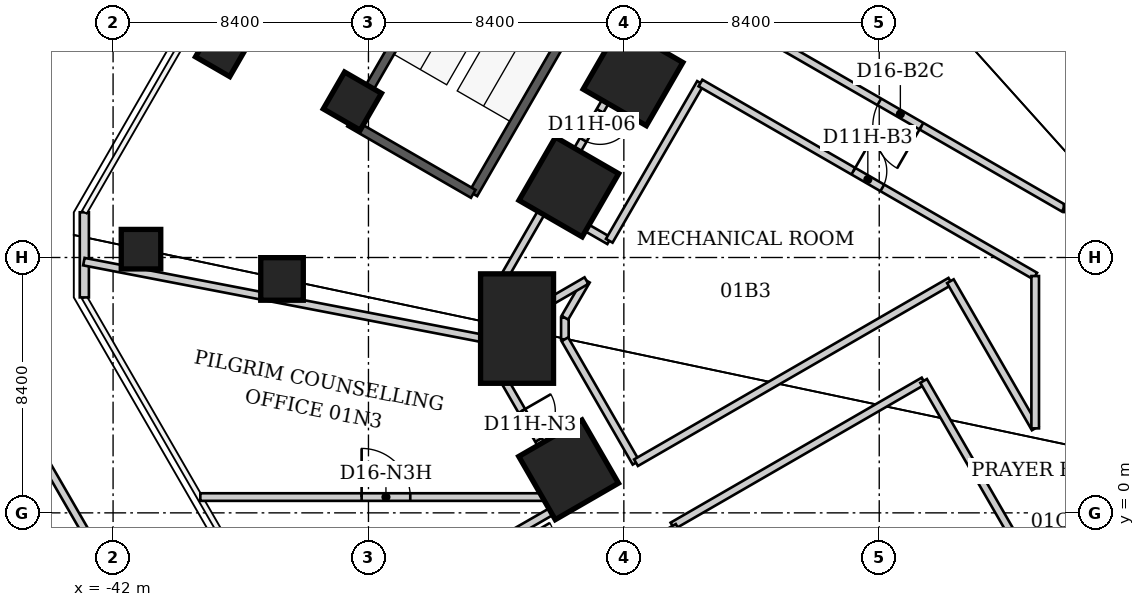
"""IFC4 building model, lengths in metres.
Left out: names, types, materials, properties, quantities, classifications, styles, units other than length and angle.
Written with IfcOpenShell. Run it as: python <this file> out.ifc"""

import sys

from ifc_helpers import new_model, si_unit, direction, frame, frame_2d, origin, origin_2d, place, context, subcontext, project, spatial, rectangle, extrude, element, fill, save


model = new_model("IFC4")
c1 = context("Model", 3, precision=1e-05, world=origin(), true_north=direction((0.0, 1.0)))
c2 = subcontext(c1, "Body", "Model", "MODEL_VIEW")
j1 = project(units=[si_unit("LENGTHUNIT", "METRE"), si_unit("PLANEANGLEUNIT", "RADIAN")], contexts=[c1])
p1 = place(None, origin())
s1 = spatial("IfcSite", under=j1, at=p1, CompositionType="ELEMENT")
p2 = place(p1, origin())
s2 = spatial("IfcBuilding", under=s1, at=p2, CompositionType="ELEMENT")
p3 = place(p2, frame((0.0, 0.0, 6.0)))
s3 = spatial("IfcBuildingStorey", under=s2, at=p3, CompositionType="ELEMENT", Elevation=6.0)
p4 = place(p3, frame((-27.016, 1.416, 0.0), z_axis=(0.0, 0.0, 1.0), x_axis=(-0.866025403784, -0.5, 0.0)))
e1 = element("IfcColumn", 1, at=p4, inside=s3, PredefinedType="COLUMN", context=c2, shape_type="SweptSolid", body=[
    extrude(rectangle(XDim=2.4, YDim=2.4, at=origin_2d()), origin(), (0.0, 0.0, 1.0), 6.0),
])
p5 = place(p3, frame((-28.713, 6.062, 0.0), z_axis=(0.0, 0.0, 1.0), x_axis=(-1.0, 0.0, 0.0)))
e2 = element("IfcColumn", 2, at=p5, inside=s3, PredefinedType="COLUMN", context=c2, shape_type="SweptSolid", body=[
    extrude(rectangle(XDim=2.4, YDim=3.6, at=origin_2d()), origin(), (0.0, 0.0, 1.0), 6.0),
])
for number, where, z_axis, x_axis in (
    (3, (-27.01, 10.719, 0.0), (0.0, 0.0, 1.0), (-0.866, 0.5, 0.0)),
    (4, (-24.899, 14.375, 0.0), (0.0, 0.0, 1.0), (-0.866, 0.5, 0.0)),
):
    element("IfcColumn", number, at=place(p3, frame(where, z_axis=z_axis, x_axis=x_axis)), inside=s3, PredefinedType="COLUMN", context=c2, shape_type="SweptSolid", body=[
        extrude(rectangle(XDim=2.4, YDim=2.4, at=origin_2d()), origin(), (0.0, 0.0, 1.0), 6.0),
    ])
for number, where, z_axis, x_axis in (
    (5, (-36.443, 7.694, 0.0), (0.0, 0.0, 1.0), (-1.0, 0.0, 0.0)),
    (6, (-34.129, 13.544, 0.0), (0.0, 0.0, 1.0), (-0.866, 0.5, 0.0)),
):
    element("IfcColumn", number, at=place(p3, frame(where, z_axis=z_axis, x_axis=x_axis)), inside=s3, PredefinedType="COLUMN", context=c2, shape_type="SweptSolid", body=[
        extrude(rectangle(XDim=1.4, YDim=1.4, at=origin_2d()), origin(), (0.0, 0.0, 1.0), 6.0),
    ])
for number, where, z_axis, x_axis in (
    (7, (-41.082, 8.674, 0.0), (0.0, 0.0, 1.0), (-1.0, 0.0, 0.0)),
    (8, (-38.4, 15.239, 0.0), (0.0, 0.0, 1.0), (-0.866, 0.5, 0.0)),
):
    element("IfcColumn", number, at=place(p3, frame(where, z_axis=z_axis, x_axis=x_axis)), inside=s3, PredefinedType="COLUMN", context=c2, shape_type="SweptSolid", body=[
        extrude(rectangle(XDim=1.3, YDim=1.3, at=origin_2d()), origin(), (0.0, 0.0, 1.0), 6.0),
    ])
p6 = place(p3, frame((-42.945, 7.087, 0.0), z_axis=(0.0, 0.0, 1.0), x_axis=(0.0, 1.0, 0.0)))
e9 = element("IfcWall", 9, at=p6, inside=s3, PredefinedType="SOLIDWALL", context=c2, shape_type="SweptSolid", body=[
    extrude(rectangle(XDim=2.8, YDim=0.3, at=frame_2d((1.4, 0.0))), origin(), (0.0, 0.0, 1.0), 5.84),
])
p7 = place(p3, frame((-33.343, 35.926, 0.0), z_axis=(0.0, 0.0, 1.0), x_axis=(-0.500005626994, -0.866022155013, 0.0)))
e10 = element("IfcWall", 10, at=p7, inside=s3, PredefinedType="PARAPET", context=c2, shape_type="SweptSolid", body=[
    extrude(rectangle(XDim=28.882, YDim=0.25, at=frame_2d((14.441, 0.0))), origin(), (0.0, 0.0, 1.0), 1.1),
])
p8 = place(p3, frame((-47.782, 7.822, 0.0), z_axis=(0.0, 0.0, 1.0), x_axis=(0.499999154746, -0.866025891791, 0.0)))
e11 = element("IfcWall", 11, at=p8, inside=s3, PredefinedType="PARAPET", context=c2, shape_type="SweptSolid", body=[
    extrude(rectangle(XDim=61.33, YDim=0.25, at=frame_2d((30.665, 0.0))), origin(), (0.0, 0.0, 1.0), 1.1),
])
p9 = place(p3, frame((-39.13, 0.52, 0.0), z_axis=(0.0, 0.0, 1.0), x_axis=(1.0, 0.0, 0.0)))
e12 = element("IfcWall", 12, at=p9, inside=s3, PredefinedType="PARTITIONING", context=c2, shape_type="SweptSolid", body=[
    extrude(rectangle(XDim=12.21, YDim=0.25, at=frame_2d((6.105, 0.0))), origin(), (0.0, 0.0, 1.0), 5.75),
])
p10 = place(p9, frame((5.305, 0.0, 0.0)))
e13 = element("IfcOpeningElement", 13, at=p10, cuts=e12, PredefinedType="OPENING", context=c2, shape_type="SweptSolid", body=[
    extrude(rectangle(XDim=1.6, YDim=2.4, at=frame_2d((0.8, 1.2))), frame((0.0, 0.125, 0.0), z_axis=(0.0, -1.0, 0.0), x_axis=(1.0, 0.0, 0.0)), (0.0, 0.0, 1.0), 0.25),
])
p11 = place(p3, frame((-29.54, 5.06, 0.0), z_axis=(0.0, 0.0, 1.0), x_axis=(0.499846097802, -0.866114241029, 0.0)))
e14 = element("IfcWall", 14, at=p11, inside=s3, PredefinedType="PARTITIONING", context=c2, shape_type="SweptSolid", body=[
    extrude(rectangle(XDim=5.242, YDim=0.25, at=frame_2d((2.621, 0.0))), origin(), (0.0, 0.0, 1.0), 4.04),
])
p12 = place(p11, frame((1.971, 0.0, 0.0)))
e15 = element("IfcOpeningElement", 15, at=p12, cuts=e14, PredefinedType="OPENING", context=c2, shape_type="SweptSolid", body=[
    extrude(rectangle(XDim=1.1, YDim=2.2, at=frame_2d((0.55, 1.1))), frame((0.0, 0.125, 0.0), z_axis=(0.0, -1.0, 0.0), x_axis=(1.0, 0.0, 0.0)), (0.0, 0.0, 1.0), 0.25),
])
p13 = place(p3, frame((-29.54, 5.645, 0.0), z_axis=(0.0, 0.0, 1.0), x_axis=(0.0, -1.0, 0.0)))
e16 = element("IfcWall", 16, at=p13, inside=s3, PredefinedType="PARTITIONING", context=c2, shape_type="SweptSolid", body=[
    extrude(rectangle(XDim=0.585, YDim=0.25, at=frame_2d((0.292, 0.0))), origin(), (0.0, 0.0, 1.0), 5.84),
])
p14 = place(p3, frame((-29.54, 5.68, 0.0), z_axis=(0.0, 0.0, 1.0), x_axis=(-0.981957231685, 0.189103133611, 0.0)))
e17 = element("IfcWall", 17, at=p14, inside=s3, PredefinedType="PARTITIONING", context=c2, shape_type="SweptSolid", body=[
    extrude(rectangle(XDim=13.667, YDim=0.25, at=frame_2d((6.833, 0.0))), origin(), (0.0, 0.0, 1.0), 5.75),
])
p15 = place(p3, frame((-29.54, 7.06, 0.0), z_axis=(0.0, 0.0, 1.0), x_axis=(0.0, -1.0, 0.0)))
e18 = element("IfcWall", 18, at=p15, inside=s3, PredefinedType="PARTITIONING", context=c2, shape_type="SweptSolid", body=[
    extrude(rectangle(XDim=1.22, YDim=0.25, at=frame_2d((0.61, 0.0))), origin(), (0.0, 0.0, 1.0), 5.84),
])
p16 = place(p3, frame((-27.76, 10.15, 0.0), z_axis=(0.0, 0.0, 1.0), x_axis=(-0.499181015942, -0.8664977284, 0.0)))
e19 = element("IfcWall", 19, at=p16, inside=s3, PredefinedType="PARTITIONING", context=c2, shape_type="SweptSolid", body=[
    extrude(rectangle(XDim=3.566, YDim=0.25, at=frame_2d((1.783, 0.0))), origin(), (0.0, 0.0, 1.0), 5.84),
])
p17 = place(p3, frame((-27.76, 10.15, 0.0), z_axis=(0.0, 0.0, 1.0), x_axis=(0.866202511239, -0.499693115345, 0.0)))
e20 = element("IfcWall", 20, at=p17, inside=s3, PredefinedType="PARTITIONING", context=c2, shape_type="SweptSolid", body=[
    extrude(rectangle(XDim=2.401, YDim=0.25, at=frame_2d((1.201, 0.0))), origin(), (0.0, 0.0, 1.0), 5.84),
])
p18 = place(p3, frame((-27.14, 5.71, 0.0), z_axis=(0.0, 0.0, 1.0), x_axis=(0.0, 1.0, 0.0)))
e21 = element("IfcWall", 21, at=p18, inside=s3, PredefinedType="PARTITIONING", context=c2, shape_type="SweptSolid", body=[
    extrude(rectangle(XDim=0.71, YDim=0.25, at=frame_2d((0.355, 0.0))), origin(), (0.0, 0.0, 1.0), 5.84),
])
p19 = place(p3, frame((-27.14, 6.42, 0.0), z_axis=(0.0, 0.0, 1.0), x_axis=(0.502902974743, 0.864342870622, 0.0)))
e22 = element("IfcWall", 22, at=p19, inside=s3, PredefinedType="PARTITIONING", context=c2, shape_type="SweptSolid", body=[
    extrude(rectangle(XDim=1.412, YDim=0.25, at=frame_2d((0.706, 0.0))), origin(), (0.0, 0.0, 1.0), 5.84),
])
p20 = place(p3, frame((-26.92, 0.52, 0.0), z_axis=(0.0, 0.0, 1.0), x_axis=(0.496138938357, -0.868243142124, 0.0)))
e23 = element("IfcWall", 23, at=p20, inside=s3, PredefinedType="PARTITIONING", context=c2, shape_type="SweptSolid", body=[
    extrude(rectangle(XDim=0.081, YDim=0.25, at=frame_2d((0.041, 0.0))), origin(), (0.0, 0.0, 1.0), 5.84),
])
p21 = place(p3, frame((-26.88, 0.45, 0.0), z_axis=(0.0, 0.0, 1.0), x_axis=(-0.866853445344, -0.49856303944, 0.0)))
e24 = element("IfcWall", 24, at=p21, inside=s3, PredefinedType="PARTITIONING", context=c2, shape_type="SweptSolid", body=[
    extrude(rectangle(XDim=2.146, YDim=0.25, at=frame_2d((1.073, 0.0))), origin(), (0.0, 0.0, 1.0), 5.84),
])
p22 = place(p3, frame((-26.43, 7.64, 0.0), z_axis=(0.0, 0.0, 1.0), x_axis=(-0.865520854062, -0.500872889249, 0.0)))
e25 = element("IfcWall", 25, at=p22, inside=s3, PredefinedType="PARTITIONING", context=c2, shape_type="SweptSolid", body=[
    extrude(rectangle(XDim=3.593, YDim=0.25, at=frame_2d((1.797, 0.0))), origin(), (0.0, 0.0, 1.0), 5.84),
])
p23 = place(p3, frame((-25.68, 8.95, 0.0), z_axis=(0.0, 0.0, 1.0), x_axis=(0.50043093139, 0.865776462436, 0.0)))
e26 = element("IfcWall", 26, at=p23, inside=s3, PredefinedType="PARTITIONING", context=c2, shape_type="SweptSolid", body=[
    extrude(rectangle(XDim=5.995, YDim=0.25, at=frame_2d((2.998, 0.0))), origin(), (0.0, 0.0, 1.0), 5.84),
])
p24 = place(p3, frame((-24.8, 1.65, 0.0), z_axis=(0.0, 0.0, 1.0), x_axis=(-0.499361596599, 0.866393672555, 0.0)))
e27 = element("IfcWall", 27, at=p24, inside=s3, PredefinedType="PARTITIONING", context=c2, shape_type="SweptSolid", body=[
    extrude(rectangle(XDim=4.686, YDim=0.25, at=frame_2d((2.343, 0.0))), origin(), (0.0, 0.0, 1.0), 5.84),
])
p25 = place(p3, frame((-24.76, 15.34, 0.0), z_axis=(0.0, 0.0, 1.0), x_axis=(-0.50043093139, -0.865776462436, 0.0)))
e28 = element("IfcWall", 28, at=p25, inside=s3, PredefinedType="PARTITIONING", context=c2, shape_type="SweptSolid", body=[
    extrude(rectangle(XDim=5.995, YDim=0.25, at=frame_2d((2.998, 0.0))), origin(), (0.0, 0.0, 1.0), 4.04),
])
p26 = place(p25, frame((2.448, 0.0, 0.0)))
e29 = element("IfcOpeningElement", 29, at=p26, cuts=e28, PredefinedType="OPENING", context=c2, shape_type="SweptSolid", body=[
    extrude(rectangle(XDim=1.1, YDim=2.2, at=frame_2d((0.55, 1.1))), frame((0.0, 0.125, 0.0), z_axis=(0.0, -1.0, 0.0), x_axis=(1.0, 0.0, 0.0)), (0.0, 0.0, 1.0), 0.25),
])
p27 = place(p3, frame((-23.6, -0.43, 0.0), z_axis=(0.0, 0.0, 1.0), x_axis=(0.865975432538, 0.500086542752, 0.0)))
e30 = element("IfcWall", 30, at=p27, inside=s3, PredefinedType="PARTITIONING", context=c2, shape_type="SweptSolid", body=[
    extrude(rectangle(XDim=9.538, YDim=0.25, at=frame_2d((4.769, 0.0))), origin(), (0.0, 0.0, 1.0), 5.84),
])
p28 = place(p3, frame((-22.68, 14.14, 0.0), z_axis=(0.0, 0.0, 1.0), x_axis=(0.866256251028, -0.499599947513, 0.0)))
e31 = element("IfcWall", 31, at=p28, inside=s3, PredefinedType="PARTITIONING", context=c2, shape_type="SweptSolid", body=[
    extrude(rectangle(XDim=12.71, YDim=0.25, at=frame_2d((6.355, 0.0))), origin(), (0.0, 0.0, 1.0), 5.84),
])
p29 = place(p28, frame((5.805, 0.0, 0.0)))
e32 = element("IfcOpeningElement", 32, at=p29, cuts=e31, PredefinedType="OPENING", context=c2, shape_type="SweptSolid", body=[
    extrude(rectangle(XDim=1.1, YDim=2.2, at=frame_2d((0.55, 1.1))), frame((0.0, 0.125, 0.0), z_axis=(0.0, -1.0, 0.0), x_axis=(1.0, 0.0, 0.0)), (0.0, 0.0, 1.0), 0.25),
])
p30 = place(p3, frame((-20.6, -5.62, 0.0), z_axis=(0.0, 0.0, 1.0), x_axis=(-0.50043093139, 0.865776462436, 0.0)))
e33 = element("IfcWall", 33, at=p30, inside=s3, PredefinedType="PARTITIONING", context=c2, shape_type="SweptSolid", body=[
    extrude(rectangle(XDim=5.995, YDim=0.25, at=frame_2d((2.998, 0.0))), origin(), (0.0, 0.0, 1.0), 5.84),
])
p31 = place(p3, frame((-15.34, 4.34, 0.0), z_axis=(0.0, 0.0, 1.0), x_axis=(0.499811677007, -0.866134104817, 0.0)))
e34 = element("IfcWall", 34, at=p31, inside=s3, PredefinedType="PARTITIONING", context=c2, shape_type="SweptSolid", body=[
    extrude(rectangle(XDim=7.343, YDim=0.25, at=frame_2d((3.671, 0.0))), origin(), (0.0, 0.0, 1.0), 5.84),
])
p32 = place(p3, frame((-14.46, 7.62, 0.0), z_axis=(0.0, 0.0, 1.0), x_axis=(-0.866012263686, -0.500022758628, 0.0)))
e35 = element("IfcWall", 35, at=p32, inside=s3, PredefinedType="PARTITIONING", context=c2, shape_type="SweptSolid", body=[
    extrude(rectangle(XDim=11.94, YDim=0.25, at=frame_2d((5.97, 0.0))), origin(), (0.0, 0.0, 1.0), 5.84),
])
p33 = place(p3, frame((-11.67, 2.78, 0.0), z_axis=(0.0, 0.0, 1.0), x_axis=(-0.49941093891, 0.866365231353, 0.0)))
e36 = element("IfcWall", 36, at=p33, inside=s3, PredefinedType="PARTITIONING", context=c2, shape_type="SweptSolid", body=[
    extrude(rectangle(XDim=5.587, YDim=0.25, at=frame_2d((2.793, 0.0))), origin(), (0.0, 0.0, 1.0), 5.84),
])
p34 = place(p3, frame((-11.67, 7.79, 0.0), z_axis=(0.0, 0.0, 1.0), x_axis=(0.0, -1.0, 0.0)))
e37 = element("IfcWall", 37, at=p34, inside=s3, PredefinedType="PARTITIONING", context=c2, shape_type="SweptSolid", body=[
    extrude(rectangle(XDim=5.01, YDim=0.25, at=frame_2d((2.505, 0.0))), origin(), (0.0, 0.0, 1.0), 5.84),
])
p35 = place(p3, frame((-10.73, 10.02, 0.0), z_axis=(0.0, 0.0, 1.0), x_axis=(-0.866254357941, 0.499603229922, 0.0)))
e38 = element("IfcWall", 38, at=p35, inside=s3, PredefinedType="PARTITIONING", context=c2, shape_type="SweptSolid", body=[
    extrude(rectangle(XDim=12.41, YDim=0.25, at=frame_2d((6.205, 0.0))), origin(), (0.0, 0.0, 1.0), 5.84),
])
p36 = place(p35, frame((5.405, 0.0, 0.0)))
e39 = element("IfcOpeningElement", 39, at=p36, cuts=e38, PredefinedType="OPENING", context=c2, shape_type="SweptSolid", body=[
    extrude(rectangle(XDim=1.6, YDim=2.4, at=frame_2d((0.8, 1.2))), frame((0.0, 0.125, 0.0), z_axis=(0.0, -1.0, 0.0), x_axis=(1.0, 0.0, 0.0)), (0.0, 0.0, 1.0), 0.25),
])
p37 = place(p3, frame((-4.0, 10.02, 0.0), z_axis=(0.0, 0.0, 1.0), x_axis=(-1.0, 0.0, 0.0)))
e40 = element("IfcWall", 40, at=p37, inside=s3, PredefinedType="PARTITIONING", context=c2, shape_type="SweptSolid", body=[
    extrude(rectangle(XDim=6.73, YDim=0.25, at=frame_2d((3.365, 0.0))), origin(), (0.0, 0.0, 1.0), 5.84),
])
p38 = place(p3, frame((-25.504, 18.548, 0.0), z_axis=(0.0, 0.0, 1.0), x_axis=(-0.500004225487, -0.866022964185, 0.0)))
e41 = element("IfcWall", 41, at=p38, inside=s3, PredefinedType="SHEAR", context=c2, shape_type="SweptSolid", body=[
    extrude(rectangle(XDim=9.3, YDim=0.3, at=frame_2d((4.65, 0.0))), origin(), (0.0, 0.0, 1.0), 6.0),
])
p39 = place(p38, frame((0.3, 0.0, 0.0)))
e42 = element("IfcOpeningElement", 42, at=p39, cuts=e41, PredefinedType="OPENING", context=c2, shape_type="SweptSolid", body=[
    extrude(rectangle(XDim=1.8, YDim=2.4, at=frame_2d((0.9, 1.2))), frame((0.0, 0.15, 0.0), z_axis=(0.0, -1.0, 0.0), x_axis=(1.0, 0.0, 0.0)), (0.0, 0.0, 1.0), 0.3),
])
p40 = place(p3, frame((-30.154, 10.494, 0.0), z_axis=(0.0, 0.0, 1.0), x_axis=(-0.866016039709, 0.500016218704, 0.0)))
e43 = element("IfcWall", 43, at=p40, inside=s3, PredefinedType="SHEAR", context=c2, shape_type="SweptSolid", body=[
    extrude(rectangle(XDim=4.7, YDim=0.3, at=frame_2d((2.35, 0.0))), origin(), (0.0, 0.0, 1.0), 6.0),
])
p41 = place(p3, frame((-34.224, 12.844, 0.0), z_axis=(0.0, 0.0, 1.0), x_axis=(0.500015592816, 0.866016401081, 0.0)))
e44 = element("IfcWall", 44, at=p41, inside=s3, PredefinedType="SHEAR", context=c2, shape_type="SweptSolid", body=[
    extrude(rectangle(XDim=9.3, YDim=0.3, at=frame_2d((4.65, 0.0))), origin(), (0.0, 0.0, 1.0), 6.0),
])
p42 = place(p26, origin())
e45 = element("IfcDoor", 45, at=p42, inside=s3, OperationType="SINGLE_SWING_LEFT", PredefinedType="DOOR", context=c2, shape_type="SweptSolid", body=[
    extrude(rectangle(XDim=1.1, YDim=2.2, at=frame_2d((0.55, 1.1))), frame((0.0, 0.025, 0.0), z_axis=(0.0, -1.0, 0.0), x_axis=(1.0, 0.0, 0.0)), (0.0, 0.0, 1.0), 0.05),
])
fill(e29, e45)
p43 = place(p29, origin())
e46 = element("IfcDoor", 46, at=p43, inside=s3, OperationType="SINGLE_SWING_LEFT", PredefinedType="DOOR", context=c2, shape_type="SweptSolid", body=[
    extrude(rectangle(XDim=1.1, YDim=2.2, at=frame_2d((0.55, 1.1))), frame((0.0, 0.025, 0.0), z_axis=(0.0, -1.0, 0.0), x_axis=(1.0, 0.0, 0.0)), (0.0, 0.0, 1.0), 0.05),
])
fill(e32, e46)
p44 = place(p12, origin())
e47 = element("IfcDoor", 47, at=p44, inside=s3, OperationType="SINGLE_SWING_LEFT", PredefinedType="DOOR", context=c2, shape_type="SweptSolid", body=[
    extrude(rectangle(XDim=1.1, YDim=2.2, at=frame_2d((0.55, 1.1))), frame((0.0, 0.025, 0.0), z_axis=(0.0, -1.0, 0.0), x_axis=(1.0, 0.0, 0.0)), (0.0, 0.0, 1.0), 0.05),
])
fill(e15, e47)
p45 = place(p36, origin())
e48 = element("IfcDoor", 48, at=p45, inside=s3, OperationType="DOUBLE_DOOR_SINGLE_SWING", PredefinedType="DOOR", context=c2, shape_type="SweptSolid", body=[
    extrude(rectangle(XDim=1.6, YDim=2.4, at=frame_2d((0.8, 1.2))), frame((0.0, 0.025, 0.0), z_axis=(0.0, -1.0, 0.0), x_axis=(1.0, 0.0, 0.0)), (0.0, 0.0, 1.0), 0.05),
])
fill(e39, e48)
p46 = place(p10, origin())
e49 = element("IfcDoor", 49, at=p46, inside=s3, OperationType="DOUBLE_DOOR_SINGLE_SWING", PredefinedType="DOOR", context=c2, shape_type="SweptSolid", body=[
    extrude(rectangle(XDim=1.6, YDim=2.4, at=frame_2d((0.8, 1.2))), frame((0.0, 0.025, 0.0), z_axis=(0.0, -1.0, 0.0), x_axis=(1.0, 0.0, 0.0)), (0.0, 0.0, 1.0), 0.05),
])
fill(e13, e49)
save(model, sys.argv[1])
